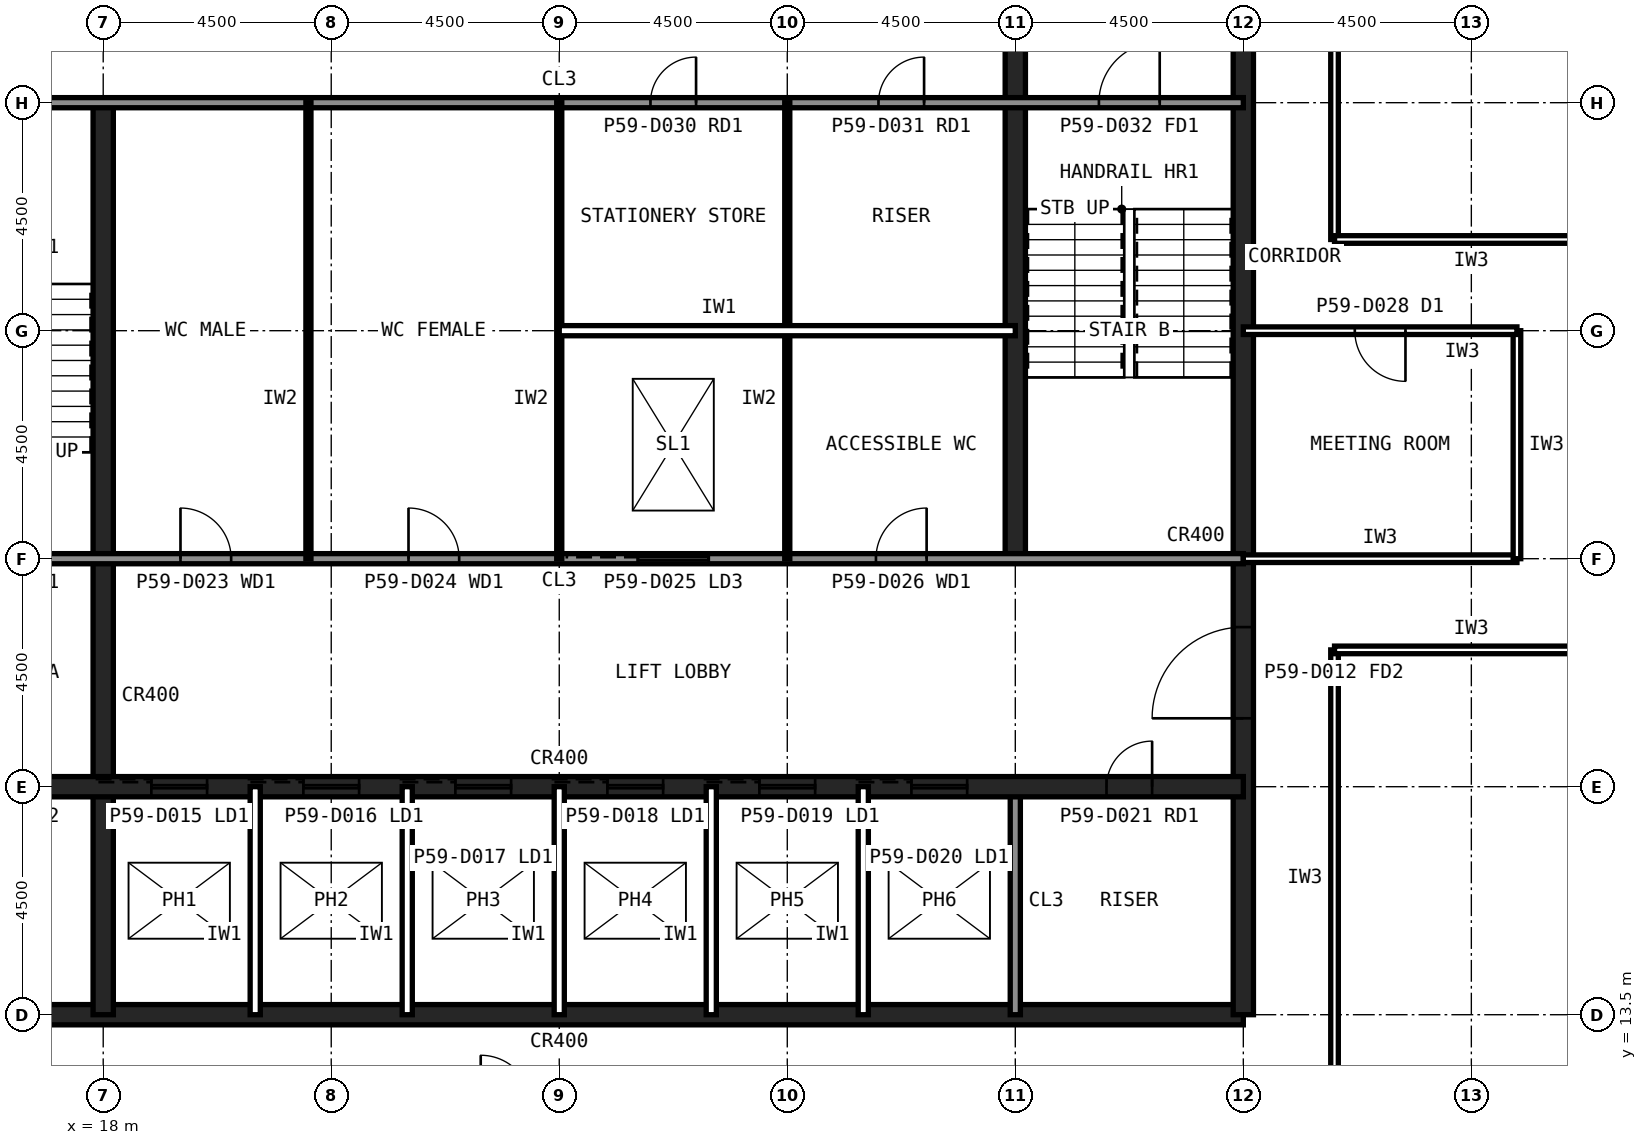
"""IFC4 building model, lengths in metres.
Left out: names, types, materials, properties, quantities, classifications, styles, units other than length and angle.
Written with IfcOpenShell. Run it as: python <this file> out.ifc"""

import sys

from ifc_helpers import new_model, si_unit, direction, frame, frame_2d, origin, place, context, subcontext, project, spatial, rectangle, extrude, element, fill, save


model = new_model("IFC4")
c1 = context("Model", 3, precision=1e-05, world=origin(), true_north=direction((0.0, 1.0)))
c2 = subcontext(c1, "Body", "Model", "MODEL_VIEW")
j1 = project(units=[si_unit("LENGTHUNIT", "METRE"), si_unit("PLANEANGLEUNIT", "RADIAN")], contexts=[c1])
p1 = place(None, origin())
s1 = spatial("IfcSite", under=j1, at=p1, CompositionType="ELEMENT")
p2 = place(p1, origin())
s2 = spatial("IfcBuilding", under=s1, at=p2, CompositionType="ELEMENT")
p3 = place(p2, frame((0.0, 0.0, 246.6)))
s3 = spatial("IfcBuildingStorey", under=s2, at=p3, CompositionType="ELEMENT", Elevation=246.6)
p4 = place(p3, frame((13.5, 13.5, 0.0), z_axis=(0.0, 0.0, 1.0), x_axis=(1.0, 0.0, 0.0)))
e1 = element("IfcWall", 1, at=p4, inside=s3, PredefinedType="SHEAR", context=c2, shape_type="SweptSolid", body=[
    extrude(rectangle(XDim=27.0, YDim=0.4, at=frame_2d((13.5, 0.0))), origin(), (0.0, 0.0, 1.0), 4.0),
])
p5 = place(p3, frame((40.5, 13.5, 0.0), z_axis=(0.0, 0.0, 1.0), x_axis=(0.0, 1.0, 0.0)))
e2 = element("IfcWall", 2, at=p5, inside=s3, PredefinedType="SHEAR", context=c2, shape_type="SweptSolid", body=[
    extrude(rectangle(XDim=27.0, YDim=0.4, at=frame_2d((13.5, 0.0))), origin(), (0.0, 0.0, 1.0), 4.0),
])
p6 = place(p5, frame((5.85, 0.0, 0.0)))
e3 = element("IfcOpeningElement", 3, at=p6, cuts=e2, PredefinedType="OPENING", context=c2, shape_type="SweptSolid", body=[
    extrude(rectangle(XDim=1.8, YDim=2.1, at=frame_2d((0.9, 1.05))), frame((0.0, 0.21, 0.0), z_axis=(0.0, -1.0, 0.0), x_axis=(1.0, 0.0, 0.0)), (0.0, 0.0, 1.0), 0.42),
])
p7 = place(p5, frame((19.65, 0.0, 0.0)))
e4 = element("IfcOpeningElement", 4, at=p7, cuts=e2, PredefinedType="OPENING", context=c2, shape_type="SweptSolid", body=[
    extrude(rectangle(XDim=1.2, YDim=2.1, at=frame_2d((0.6, 1.05))), frame((0.0, 0.21, 0.0), z_axis=(0.0, -1.0, 0.0), x_axis=(1.0, 0.0, 0.0)), (0.0, 0.0, 1.0), 0.42),
])
p8 = place(p3, frame((18.0, 13.5, 0.0), z_axis=(0.0, 0.0, 1.0), x_axis=(0.0, 1.0, 0.0)))
e5 = element("IfcWall", 5, at=p8, inside=s3, PredefinedType="SHEAR", context=c2, shape_type="SweptSolid", body=[
    extrude(rectangle(XDim=18.0, YDim=0.4, at=frame_2d((9.0, 0.0))), origin(), (0.0, 0.0, 1.0), 4.0),
])
p9 = place(p3, frame((36.0, 13.5, 0.0), z_axis=(0.0, 0.0, 1.0), x_axis=(0.0, 1.0, 0.0)))
e6 = element("IfcWall", 6, at=p9, inside=s3, PredefinedType="SOLIDWALL", context=c2, shape_type="SweptSolid", body=[
    extrude(rectangle(XDim=4.5, YDim=0.2, at=frame_2d((2.25, 0.0))), origin(), (0.0, 0.0, 1.0), 3.84),
])
p10 = place(p3, frame((36.0, 22.5, 0.0), z_axis=(0.0, 0.0, 1.0), x_axis=(0.0, 1.0, 0.0)))
e7 = element("IfcWall", 7, at=p10, inside=s3, PredefinedType="SHEAR", context=c2, shape_type="SweptSolid", body=[
    extrude(rectangle(XDim=18.0, YDim=0.4, at=frame_2d((9.0, 0.0))), origin(), (0.0, 0.0, 1.0), 4.0),
])
p11 = place(p3, frame((13.5, 18.0, 0.0), z_axis=(0.0, 0.0, 1.0), x_axis=(1.0, 0.0, 0.0)))
e8 = element("IfcWall", 8, at=p11, inside=s3, PredefinedType="SHEAR", context=c2, shape_type="SweptSolid", body=[
    extrude(rectangle(XDim=27.0, YDim=0.4, at=frame_2d((13.5, 0.0))), origin(), (0.0, 0.0, 1.0), 4.0),
])
p12 = place(p11, frame((24.3, 0.0, 0.0)))
e9 = element("IfcOpeningElement", 9, at=p12, cuts=e8, PredefinedType="OPENING", context=c2, shape_type="SweptSolid", body=[
    extrude(rectangle(XDim=0.9, YDim=2.1, at=frame_2d((0.45, 1.05))), frame((0.0, 0.21, 0.0), z_axis=(0.0, -1.0, 0.0), x_axis=(1.0, 0.0, 0.0)), (0.0, 0.0, 1.0), 0.42),
])
p13 = place(p11, frame((5.45, 0.0, 0.0)))
e10 = element("IfcOpeningElement", 10, at=p13, cuts=e8, PredefinedType="OPENING", context=c2, shape_type="SweptSolid", body=[
    extrude(rectangle(XDim=1.1, YDim=2.1, at=frame_2d((0.55, 1.05))), frame((0.0, 0.21, 0.0), z_axis=(0.0, -1.0, 0.0), x_axis=(1.0, 0.0, 0.0)), (0.0, 0.0, 1.0), 0.42),
])
p14 = place(p11, frame((8.45, 0.0, 0.0)))
e11 = element("IfcOpeningElement", 11, at=p14, cuts=e8, PredefinedType="OPENING", context=c2, shape_type="SweptSolid", body=[
    extrude(rectangle(XDim=1.1, YDim=2.1, at=frame_2d((0.55, 1.05))), frame((0.0, 0.21, 0.0), z_axis=(0.0, -1.0, 0.0), x_axis=(1.0, 0.0, 0.0)), (0.0, 0.0, 1.0), 0.42),
])
p15 = place(p11, frame((11.45, 0.0, 0.0)))
e12 = element("IfcOpeningElement", 12, at=p15, cuts=e8, PredefinedType="OPENING", context=c2, shape_type="SweptSolid", body=[
    extrude(rectangle(XDim=1.1, YDim=2.1, at=frame_2d((0.55, 1.05))), frame((0.0, 0.21, 0.0), z_axis=(0.0, -1.0, 0.0), x_axis=(1.0, 0.0, 0.0)), (0.0, 0.0, 1.0), 0.42),
])
p16 = place(p11, frame((14.45, 0.0, 0.0)))
e13 = element("IfcOpeningElement", 13, at=p16, cuts=e8, PredefinedType="OPENING", context=c2, shape_type="SweptSolid", body=[
    extrude(rectangle(XDim=1.1, YDim=2.1, at=frame_2d((0.55, 1.05))), frame((0.0, 0.21, 0.0), z_axis=(0.0, -1.0, 0.0), x_axis=(1.0, 0.0, 0.0)), (0.0, 0.0, 1.0), 0.42),
])
p17 = place(p11, frame((17.45, 0.0, 0.0)))
e14 = element("IfcOpeningElement", 14, at=p17, cuts=e8, PredefinedType="OPENING", context=c2, shape_type="SweptSolid", body=[
    extrude(rectangle(XDim=1.1, YDim=2.1, at=frame_2d((0.55, 1.05))), frame((0.0, 0.21, 0.0), z_axis=(0.0, -1.0, 0.0), x_axis=(1.0, 0.0, 0.0)), (0.0, 0.0, 1.0), 0.42),
])
p18 = place(p11, frame((20.45, 0.0, 0.0)))
e15 = element("IfcOpeningElement", 15, at=p18, cuts=e8, PredefinedType="OPENING", context=c2, shape_type="SweptSolid", body=[
    extrude(rectangle(XDim=1.1, YDim=2.1, at=frame_2d((0.55, 1.05))), frame((0.0, 0.21, 0.0), z_axis=(0.0, -1.0, 0.0), x_axis=(1.0, 0.0, 0.0)), (0.0, 0.0, 1.0), 0.42),
])
p19 = place(p11, frame((1.6, 0.0, 0.0)))
e16 = element("IfcOpeningElement", 16, at=p19, cuts=e8, PredefinedType="OPENING", context=c2, shape_type="SweptSolid", body=[
    extrude(rectangle(XDim=1.3, YDim=2.2, at=frame_2d((0.65, 1.1))), frame((0.0, 0.21, 0.0), z_axis=(0.0, -1.0, 0.0), x_axis=(1.0, 0.0, 0.0)), (0.0, 0.0, 1.0), 0.42),
])
p20 = place(p3, frame((13.5, 22.5, 0.0), z_axis=(0.0, 0.0, 1.0), x_axis=(1.0, 0.0, 0.0)))
e17 = element("IfcWall", 17, at=p20, inside=s3, PredefinedType="SOLIDWALL", context=c2, shape_type="SweptSolid", body=[
    extrude(rectangle(XDim=27.0, YDim=0.2, at=frame_2d((13.5, 0.0))), origin(), (0.0, 0.0, 1.0), 3.84),
])
p21 = place(p20, frame((1.65, 0.0, 0.0)))
e18 = element("IfcOpeningElement", 18, at=p21, cuts=e17, PredefinedType="OPENING", context=c2, shape_type="SweptSolid", body=[
    extrude(rectangle(XDim=1.2, YDim=2.1, at=frame_2d((0.6, 1.05))), frame((0.0, 0.11, 0.0), z_axis=(0.0, -1.0, 0.0), x_axis=(1.0, 0.0, 0.0)), (0.0, 0.0, 1.0), 0.22),
])
p22 = place(p20, frame((6.025, 0.0, 0.0)))
e19 = element("IfcOpeningElement", 19, at=p22, cuts=e17, PredefinedType="OPENING", context=c2, shape_type="SweptSolid", body=[
    extrude(rectangle(XDim=1.0, YDim=2.1, at=frame_2d((0.5, 1.05))), frame((0.0, 0.11, 0.0), z_axis=(0.0, -1.0, 0.0), x_axis=(1.0, 0.0, 0.0)), (0.0, 0.0, 1.0), 0.22),
])
p23 = place(p20, frame((10.525, 0.0, 0.0)))
e20 = element("IfcOpeningElement", 20, at=p23, cuts=e17, PredefinedType="OPENING", context=c2, shape_type="SweptSolid", body=[
    extrude(rectangle(XDim=1.0, YDim=2.1, at=frame_2d((0.5, 1.05))), frame((0.0, 0.11, 0.0), z_axis=(0.0, -1.0, 0.0), x_axis=(1.0, 0.0, 0.0)), (0.0, 0.0, 1.0), 0.22),
])
p24 = place(p20, frame((19.75, 0.0, 0.0)))
e21 = element("IfcOpeningElement", 21, at=p24, cuts=e17, PredefinedType="OPENING", context=c2, shape_type="SweptSolid", body=[
    extrude(rectangle(XDim=1.0, YDim=2.1, at=frame_2d((0.5, 1.05))), frame((0.0, 0.11, 0.0), z_axis=(0.0, -1.0, 0.0), x_axis=(1.0, 0.0, 0.0)), (0.0, 0.0, 1.0), 0.22),
])
p25 = place(p20, frame((15.05, 0.0, 0.0)))
e22 = element("IfcOpeningElement", 22, at=p25, cuts=e17, PredefinedType="OPENING", context=c2, shape_type="SweptSolid", body=[
    extrude(rectangle(XDim=1.4, YDim=2.4, at=frame_2d((0.7, 1.2))), frame((0.0, 0.11, 0.0), z_axis=(0.0, -1.0, 0.0), x_axis=(1.0, 0.0, 0.0)), (0.0, 0.0, 1.0), 0.22),
])
p26 = place(p3, frame((13.5, 31.5, 0.0), z_axis=(0.0, 0.0, 1.0), x_axis=(1.0, 0.0, 0.0)))
e23 = element("IfcWall", 23, at=p26, inside=s3, PredefinedType="SOLIDWALL", context=c2, shape_type="SweptSolid", body=[
    extrude(rectangle(XDim=27.0, YDim=0.2, at=frame_2d((13.5, 0.0))), origin(), (0.0, 0.0, 1.0), 3.84),
])
p27 = place(p26, frame((24.15, 0.0, 0.0)))
e24 = element("IfcOpeningElement", 24, at=p27, cuts=e23, PredefinedType="OPENING", context=c2, shape_type="SweptSolid", body=[
    extrude(rectangle(XDim=1.2, YDim=2.1, at=frame_2d((0.6, 1.05))), frame((0.0, 0.11, 0.0), z_axis=(0.0, -1.0, 0.0), x_axis=(1.0, 0.0, 0.0)), (0.0, 0.0, 1.0), 0.22),
])
p28 = place(p26, frame((15.3, 0.0, 0.0)))
e25 = element("IfcOpeningElement", 25, at=p28, cuts=e23, PredefinedType="OPENING", context=c2, shape_type="SweptSolid", body=[
    extrude(rectangle(XDim=0.9, YDim=2.1, at=frame_2d((0.45, 1.05))), frame((0.0, 0.11, 0.0), z_axis=(0.0, -1.0, 0.0), x_axis=(1.0, 0.0, 0.0)), (0.0, 0.0, 1.0), 0.22),
])
p29 = place(p26, frame((19.8, 0.0, 0.0)))
e26 = element("IfcOpeningElement", 26, at=p29, cuts=e23, PredefinedType="OPENING", context=c2, shape_type="SweptSolid", body=[
    extrude(rectangle(XDim=0.9, YDim=2.1, at=frame_2d((0.45, 1.05))), frame((0.0, 0.11, 0.0), z_axis=(0.0, -1.0, 0.0), x_axis=(1.0, 0.0, 0.0)), (0.0, 0.0, 1.0), 0.22),
])
for number, where, z_axis, x_axis in (
    (27, (21.0, 13.5, 0.0), (0.0, 0.0, 1.0), (0.0, 1.0, 0.0)),
    (28, (24.0, 13.5, 0.0), (0.0, 0.0, 1.0), (0.0, 1.0, 0.0)),
    (29, (27.0, 13.5, 0.0), (0.0, 0.0, 1.0), (0.0, 1.0, 0.0)),
    (30, (30.0, 13.5, 0.0), (0.0, 0.0, 1.0), (0.0, 1.0, 0.0)),
    (31, (33.0, 13.5, 0.0), (0.0, 0.0, 1.0), (0.0, 1.0, 0.0)),
):
    element("IfcWall", number, at=place(p3, frame(where, z_axis=z_axis, x_axis=x_axis)), inside=s3, PredefinedType="PARTITIONING", context=c2, shape_type="SweptSolid", body=[
        extrude(rectangle(XDim=4.5, YDim=0.2, at=frame_2d((2.25, 0.0))), origin(), (0.0, 0.0, 1.0), 3.84),
    ])
for number, where, z_axis, x_axis in (
    (32, (22.05, 22.5, 0.0), (0.0, 0.0, 1.0), (0.0, 1.0, 0.0)),
    (33, (27.0, 22.5, 0.0), (0.0, 0.0, 1.0), (0.0, 1.0, 0.0)),
    (34, (31.5, 22.5, 0.0), (0.0, 0.0, 1.0), (0.0, 1.0, 0.0)),
):
    element("IfcWall", number, at=place(p3, frame(where, z_axis=z_axis, x_axis=x_axis)), inside=s3, PredefinedType="PLUMBINGWALL", context=c2, shape_type="SweptSolid", body=[
        extrude(rectangle(XDim=9.0, YDim=0.1, at=frame_2d((4.5, 0.0))), origin(), (0.0, 0.0, 1.0), 3.84),
    ])
p30 = place(p3, frame((27.0, 27.0, 0.0), z_axis=(0.0, 0.0, 1.0), x_axis=(1.0, 0.0, 0.0)))
e35 = element("IfcWall", 35, at=p30, inside=s3, PredefinedType="PARTITIONING", context=c2, shape_type="SweptSolid", body=[
    extrude(rectangle(XDim=9.0, YDim=0.2, at=frame_2d((4.5, 0.0))), origin(), (0.0, 0.0, 1.0), 3.84),
])
p31 = place(p3, frame((42.3, 28.8, 0.0), z_axis=(0.0, 0.0, 1.0), x_axis=(0.0, 1.0, 0.0)))
e36 = element("IfcWall", 36, at=p31, inside=s3, PredefinedType="PARTITIONING", context=c2, shape_type="SweptSolid", body=[
    extrude(rectangle(XDim=13.5, YDim=0.15, at=frame_2d((6.75, 0.0))), origin(), (0.0, 0.0, 1.0), 3.84),
])
p32 = place(p31, frame((6.25, 0.0, 0.0)))
e37 = element("IfcOpeningElement", 37, at=p32, cuts=e36, PredefinedType="OPENING", context=c2, shape_type="SweptSolid", body=[
    extrude(rectangle(XDim=1.0, YDim=2.1, at=frame_2d((0.5, 1.05))), frame((0.0, 0.085, 0.0), z_axis=(0.0, -1.0, 0.0), x_axis=(1.0, 0.0, 0.0)), (0.0, 0.0, 1.0), 0.17),
])
p33 = place(p3, frame((42.3, 11.7, 0.0), z_axis=(0.0, 0.0, 1.0), x_axis=(0.0, 1.0, 0.0)))
e38 = element("IfcWall", 38, at=p33, inside=s3, PredefinedType="PARTITIONING", context=c2, shape_type="SweptSolid", body=[
    extrude(rectangle(XDim=9.0, YDim=0.15, at=frame_2d((4.5, 0.0))), origin(), (0.0, 0.0, 1.0), 3.84),
])
for number, where, z_axis, x_axis in (
    (39, (42.3, 20.7, 0.0), (0.0, 0.0, 1.0), (1.0, 0.0, 0.0)),
    (40, (47.7, 28.8, 0.0), (0.0, 0.0, 1.0), (-1.0, 0.0, 0.0)),
):
    element("IfcWall", number, at=place(p3, frame(where, z_axis=z_axis, x_axis=x_axis)), inside=s3, PredefinedType="PARTITIONING", context=c2, shape_type="SweptSolid", body=[
        extrude(rectangle(XDim=5.4, YDim=0.15, at=frame_2d((2.7, 0.0))), origin(), (0.0, 0.0, 1.0), 3.84),
    ])
p34 = place(p3, frame((40.5, 22.5, 0.0), z_axis=(0.0, 0.0, 1.0), x_axis=(1.0, 0.0, 0.0)))
e41 = element("IfcWall", 41, at=p34, inside=s3, PredefinedType="PARTITIONING", context=c2, shape_type="SweptSolid", body=[
    extrude(rectangle(XDim=5.4, YDim=0.15, at=frame_2d((2.7, 0.0))), origin(), (0.0, 0.0, 1.0), 2.989),
])
p35 = place(p3, frame((45.9, 22.5, 0.0), z_axis=(0.0, 0.0, 1.0), x_axis=(0.0, 1.0, 0.0)))
e42 = element("IfcWall", 42, at=p35, inside=s3, PredefinedType="PARTITIONING", context=c2, shape_type="SweptSolid", body=[
    extrude(rectangle(XDim=4.5, YDim=0.15, at=frame_2d((2.25, 0.0))), origin(), (0.0, 0.0, 1.0), 3.84),
])
p36 = place(p3, frame((45.9, 27.0, 0.0), z_axis=(0.0, 0.0, 1.0), x_axis=(-1.0, 0.0, 0.0)))
e43 = element("IfcWall", 43, at=p36, inside=s3, PredefinedType="PARTITIONING", context=c2, shape_type="SweptSolid", body=[
    extrude(rectangle(XDim=5.4, YDim=0.15, at=frame_2d((2.7, 0.0))), origin(), (0.0, 0.0, 1.0), 2.989),
])
p37 = place(p36, frame((2.2, 0.0, 0.0)))
e44 = element("IfcOpeningElement", 44, at=p37, cuts=e43, PredefinedType="OPENING", context=c2, shape_type="SweptSolid", body=[
    extrude(rectangle(XDim=1.0, YDim=2.1, at=frame_2d((0.5, 1.05))), frame((0.0, 0.085, 0.0), z_axis=(0.0, -1.0, 0.0), x_axis=(1.0, 0.0, 0.0)), (0.0, 0.0, 1.0), 0.17),
])
p38 = place(p6, origin())
e45 = element("IfcDoor", 45, at=p38, inside=s3, OperationType="SINGLE_SWING_LEFT", PredefinedType="DOOR", context=c2, shape_type="SweptSolid", body=[
    extrude(rectangle(XDim=1.8, YDim=2.1, at=frame_2d((0.9, 1.05))), frame((0.0, 0.025, 0.0), z_axis=(0.0, -1.0, 0.0), x_axis=(1.0, 0.0, 0.0)), (0.0, 0.0, 1.0), 0.05),
])
fill(e3, e45)
p39 = place(p27, origin())
e46 = element("IfcDoor", 46, at=p39, inside=s3, OperationType="SINGLE_SWING_RIGHT", PredefinedType="DOOR", context=c2, shape_type="SweptSolid", body=[
    extrude(rectangle(XDim=1.2, YDim=2.1, at=frame_2d((0.6, 1.05))), frame((0.0, 0.025, 0.0), z_axis=(0.0, -1.0, 0.0), x_axis=(1.0, 0.0, 0.0)), (0.0, 0.0, 1.0), 0.05),
])
fill(e24, e46)
p40 = place(p22, origin())
e47 = element("IfcDoor", 47, at=p40, inside=s3, OperationType="SINGLE_SWING_LEFT", PredefinedType="DOOR", context=c2, shape_type="SweptSolid", body=[
    extrude(rectangle(XDim=1.0, YDim=2.1, at=frame_2d((0.5, 1.05))), frame((0.0, 0.025, 0.0), z_axis=(0.0, -1.0, 0.0), x_axis=(1.0, 0.0, 0.0)), (0.0, 0.0, 1.0), 0.05),
])
fill(e19, e47)
p41 = place(p23, origin())
e48 = element("IfcDoor", 48, at=p41, inside=s3, OperationType="SINGLE_SWING_LEFT", PredefinedType="DOOR", context=c2, shape_type="SweptSolid", body=[
    extrude(rectangle(XDim=1.0, YDim=2.1, at=frame_2d((0.5, 1.05))), frame((0.0, 0.025, 0.0), z_axis=(0.0, -1.0, 0.0), x_axis=(1.0, 0.0, 0.0)), (0.0, 0.0, 1.0), 0.05),
])
fill(e20, e48)
p42 = place(p24, origin())
e49 = element("IfcDoor", 49, at=p42, inside=s3, OperationType="SINGLE_SWING_RIGHT", PredefinedType="DOOR", context=c2, shape_type="SweptSolid", body=[
    extrude(rectangle(XDim=1.0, YDim=2.1, at=frame_2d((0.5, 1.05))), frame((0.0, 0.025, 0.0), z_axis=(0.0, -1.0, 0.0), x_axis=(1.0, 0.0, 0.0)), (0.0, 0.0, 1.0), 0.05),
])
fill(e21, e49)
p43 = place(p28, origin())
e50 = element("IfcDoor", 50, at=p43, inside=s3, OperationType="SINGLE_SWING_RIGHT", PredefinedType="DOOR", context=c2, shape_type="SweptSolid", body=[
    extrude(rectangle(XDim=0.9, YDim=2.1, at=frame_2d((0.45, 1.05))), frame((0.0, 0.025, 0.0), z_axis=(0.0, -1.0, 0.0), x_axis=(1.0, 0.0, 0.0)), (0.0, 0.0, 1.0), 0.05),
])
fill(e25, e50)
p44 = place(p29, origin())
e51 = element("IfcDoor", 51, at=p44, inside=s3, OperationType="SINGLE_SWING_RIGHT", PredefinedType="DOOR", context=c2, shape_type="SweptSolid", body=[
    extrude(rectangle(XDim=0.9, YDim=2.1, at=frame_2d((0.45, 1.05))), frame((0.0, 0.025, 0.0), z_axis=(0.0, -1.0, 0.0), x_axis=(1.0, 0.0, 0.0)), (0.0, 0.0, 1.0), 0.05),
])
fill(e26, e51)
p45 = place(p12, origin())
e52 = element("IfcDoor", 52, at=p45, inside=s3, OperationType="SINGLE_SWING_RIGHT", PredefinedType="DOOR", context=c2, shape_type="SweptSolid", body=[
    extrude(rectangle(XDim=0.9, YDim=2.1, at=frame_2d((0.45, 1.05))), frame((0.0, 0.025, 0.0), z_axis=(0.0, -1.0, 0.0), x_axis=(1.0, 0.0, 0.0)), (0.0, 0.0, 1.0), 0.05),
])
fill(e9, e52)
p46 = place(p13, origin())
e53 = element("IfcDoor", 53, at=p46, inside=s3, OperationType="SLIDING_TO_LEFT", PredefinedType="DOOR", context=c2, shape_type="SweptSolid", body=[
    extrude(rectangle(XDim=1.1, YDim=2.1, at=frame_2d((0.55, 1.05))), frame((0.0, 0.025, 0.0), z_axis=(0.0, -1.0, 0.0), x_axis=(1.0, 0.0, 0.0)), (0.0, 0.0, 1.0), 0.05),
])
fill(e10, e53)
p47 = place(p14, origin())
e54 = element("IfcDoor", 54, at=p47, inside=s3, OperationType="SLIDING_TO_LEFT", PredefinedType="DOOR", context=c2, shape_type="SweptSolid", body=[
    extrude(rectangle(XDim=1.1, YDim=2.1, at=frame_2d((0.55, 1.05))), frame((0.0, 0.025, 0.0), z_axis=(0.0, -1.0, 0.0), x_axis=(1.0, 0.0, 0.0)), (0.0, 0.0, 1.0), 0.05),
])
fill(e11, e54)
p48 = place(p15, origin())
e55 = element("IfcDoor", 55, at=p48, inside=s3, OperationType="SLIDING_TO_LEFT", PredefinedType="DOOR", context=c2, shape_type="SweptSolid", body=[
    extrude(rectangle(XDim=1.1, YDim=2.1, at=frame_2d((0.55, 1.05))), frame((0.0, 0.025, 0.0), z_axis=(0.0, -1.0, 0.0), x_axis=(1.0, 0.0, 0.0)), (0.0, 0.0, 1.0), 0.05),
])
fill(e12, e55)
p49 = place(p16, origin())
e56 = element("IfcDoor", 56, at=p49, inside=s3, OperationType="SLIDING_TO_LEFT", PredefinedType="DOOR", context=c2, shape_type="SweptSolid", body=[
    extrude(rectangle(XDim=1.1, YDim=2.1, at=frame_2d((0.55, 1.05))), frame((0.0, 0.025, 0.0), z_axis=(0.0, -1.0, 0.0), x_axis=(1.0, 0.0, 0.0)), (0.0, 0.0, 1.0), 0.05),
])
fill(e13, e56)
p50 = place(p17, origin())
e57 = element("IfcDoor", 57, at=p50, inside=s3, OperationType="SLIDING_TO_LEFT", PredefinedType="DOOR", context=c2, shape_type="SweptSolid", body=[
    extrude(rectangle(XDim=1.1, YDim=2.1, at=frame_2d((0.55, 1.05))), frame((0.0, 0.025, 0.0), z_axis=(0.0, -1.0, 0.0), x_axis=(1.0, 0.0, 0.0)), (0.0, 0.0, 1.0), 0.05),
])
fill(e14, e57)
p51 = place(p18, origin())
e58 = element("IfcDoor", 58, at=p51, inside=s3, OperationType="SLIDING_TO_LEFT", PredefinedType="DOOR", context=c2, shape_type="SweptSolid", body=[
    extrude(rectangle(XDim=1.1, YDim=2.1, at=frame_2d((0.55, 1.05))), frame((0.0, 0.025, 0.0), z_axis=(0.0, -1.0, 0.0), x_axis=(1.0, 0.0, 0.0)), (0.0, 0.0, 1.0), 0.05),
])
fill(e15, e58)
p52 = place(p25, origin())
e59 = element("IfcDoor", 59, at=p52, inside=s3, OperationType="SLIDING_TO_LEFT", PredefinedType="DOOR", context=c2, shape_type="SweptSolid", body=[
    extrude(rectangle(XDim=1.4, YDim=2.4, at=frame_2d((0.7, 1.2))), frame((0.0, 0.025, 0.0), z_axis=(0.0, -1.0, 0.0), x_axis=(1.0, 0.0, 0.0)), (0.0, 0.0, 1.0), 0.05),
])
fill(e22, e59)
p53 = place(p37, origin())
e60 = element("IfcDoor", 60, at=p53, inside=s3, OperationType="SINGLE_SWING_LEFT", PredefinedType="DOOR", context=c2, shape_type="SweptSolid", body=[
    extrude(rectangle(XDim=1.0, YDim=2.1, at=frame_2d((0.5, 1.05))), frame((0.0, 0.025, 0.0), z_axis=(0.0, -1.0, 0.0), x_axis=(1.0, 0.0, 0.0)), (0.0, 0.0, 1.0), 0.05),
])
fill(e44, e60)
save(model, sys.argv[1])
